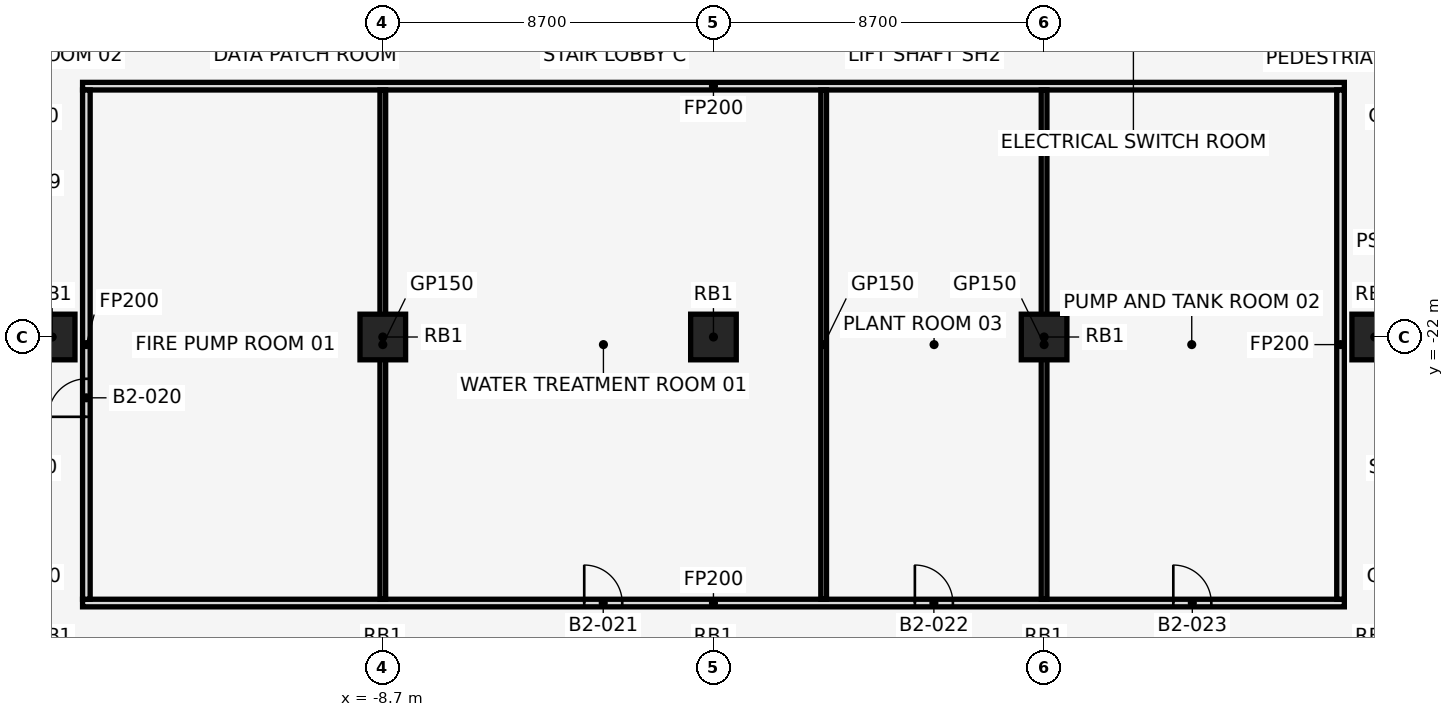
"""IFC4 building model, lengths in metres.
Left out: names, types, materials, properties, quantities, classifications, styles, units other than length and angle.
Written with IfcOpenShell. Run it as: python <this file> out.ifc"""

import sys

from ifc_helpers import new_model, si_unit, direction, frame, frame_2d, origin, origin_2d, place, context, subcontext, project, spatial, rectangle, extrude, element, fill, save


model = new_model("IFC4")
c1 = context("Model", 3, precision=1e-05, world=origin(), true_north=direction((0.0, 1.0)))
c2 = subcontext(c1, "Body", "Model", "MODEL_VIEW")
j1 = project(units=[si_unit("LENGTHUNIT", "METRE"), si_unit("PLANEANGLEUNIT", "RADIAN")], contexts=[c1])
p1 = place(None, origin())
s1 = spatial("IfcSite", under=j1, at=p1, CompositionType="ELEMENT")
p2 = place(p1, origin())
s2 = spatial("IfcBuilding", under=s1, at=p2, CompositionType="ELEMENT")
p3 = place(p2, frame((0.0, 0.0, -10.0)))
s3 = spatial("IfcBuildingStorey", under=s2, at=p3, CompositionType="ELEMENT", Elevation=-10.0)
for number, where, z_axis, x_axis in (
    (1, (-17.4, -22.0, 0.0), (0.0, 0.0, 1.0), (1.0, 0.0, 0.0)),
    (2, (-8.7, -22.0, 0.0), (0.0, 0.0, 1.0), (1.0, 0.0, 0.0)),
    (3, (0.0, -22.0, 0.0), (0.0, 0.0, 1.0), (1.0, 0.0, 0.0)),
    (4, (8.7, -22.0, 0.0), (0.0, 0.0, 1.0), (1.0, 0.0, 0.0)),
    (5, (17.4, -22.0, 0.0), (0.0, 0.0, 1.0), (1.0, 0.0, 0.0)),
):
    element("IfcColumn", number, at=place(p3, frame(where, z_axis=z_axis, x_axis=x_axis)), inside=s3, PredefinedType="COLUMN", context=c2, shape_type="SweptSolid", body=[
        extrude(rectangle(XDim=1.2, YDim=1.2, at=origin_2d()), origin(), (0.0, 0.0, 1.0), 5.0),
    ])
p4 = place(p3, frame((-16.6, -29.0, 0.0), z_axis=(0.0, 0.0, 1.0), x_axis=(1.0, 0.0, 0.0)))
e6 = element("IfcWall", 6, at=p4, inside=s3, PredefinedType="PARTITIONING", context=c2, shape_type="SweptSolid", body=[
    extrude(rectangle(XDim=33.2, YDim=0.2, at=frame_2d((16.6, 0.0))), origin(), (0.0, 0.0, 1.0), 4.7),
])
p5 = place(p4, frame((13.2, 0.0, 0.0)))
e7 = element("IfcOpeningElement", 7, at=p5, cuts=e6, PredefinedType="OPENING", context=c2, shape_type="SweptSolid", body=[
    extrude(rectangle(XDim=1.0, YDim=2.1, at=frame_2d((0.5, 1.05))), frame((0.0, 0.112, 0.0), z_axis=(0.0, -1.0, 0.0), x_axis=(1.0, 0.0, 0.0)), (0.0, 0.0, 1.0), 0.224),
])
p6 = place(p4, frame((21.9, 0.0, 0.0)))
e8 = element("IfcOpeningElement", 8, at=p6, cuts=e6, PredefinedType="OPENING", context=c2, shape_type="SweptSolid", body=[
    extrude(rectangle(XDim=1.0, YDim=2.1, at=frame_2d((0.5, 1.05))), frame((0.0, 0.112, 0.0), z_axis=(0.0, -1.0, 0.0), x_axis=(1.0, 0.0, 0.0)), (0.0, 0.0, 1.0), 0.224),
])
p7 = place(p4, frame((28.7, 0.0, 0.0)))
e9 = element("IfcOpeningElement", 9, at=p7, cuts=e6, PredefinedType="OPENING", context=c2, shape_type="SweptSolid", body=[
    extrude(rectangle(XDim=1.0, YDim=2.1, at=frame_2d((0.5, 1.05))), frame((0.0, 0.112, 0.0), z_axis=(0.0, -1.0, 0.0), x_axis=(1.0, 0.0, 0.0)), (0.0, 0.0, 1.0), 0.224),
])
p8 = place(p3, frame((-16.6, -15.4, 0.0), z_axis=(0.0, 0.0, 1.0), x_axis=(1.0, 0.0, 0.0)))
e10 = element("IfcWall", 10, at=p8, inside=s3, PredefinedType="PARTITIONING", context=c2, shape_type="SweptSolid", body=[
    extrude(rectangle(XDim=33.2, YDim=0.2, at=frame_2d((16.6, 0.0))), origin(), (0.0, 0.0, 1.0), 4.7),
])
p9 = place(p3, frame((-16.5, -28.9, 0.0), z_axis=(0.0, 0.0, 1.0), x_axis=(0.0, 1.0, 0.0)))
e11 = element("IfcWall", 11, at=p9, inside=s3, PredefinedType="PARTITIONING", context=c2, shape_type="SweptSolid", body=[
    extrude(rectangle(XDim=13.4, YDim=0.2, at=frame_2d((6.7, 0.0))), origin(), (0.0, 0.0, 1.0), 4.7),
])
p10 = place(p9, frame((4.8, 0.0, 0.0)))
e12 = element("IfcOpeningElement", 12, at=p10, cuts=e11, PredefinedType="OPENING", context=c2, shape_type="SweptSolid", body=[
    extrude(rectangle(XDim=1.0, YDim=2.1, at=frame_2d((0.5, 1.05))), frame((0.0, 0.112, 0.0), z_axis=(0.0, -1.0, 0.0), x_axis=(1.0, 0.0, 0.0)), (0.0, 0.0, 1.0), 0.224),
])
for number, where, z_axis, x_axis in (
    (13, (-8.7, -28.9, 0.0), (0.0, 0.0, 1.0), (0.0, 1.0, 0.0)),
    (14, (2.9, -28.9, 0.0), (0.0, 0.0, 1.0), (0.0, 1.0, 0.0)),
    (15, (8.7, -28.9, 0.0), (0.0, 0.0, 1.0), (0.0, 1.0, 0.0)),
):
    element("IfcWall", number, at=place(p3, frame(where, z_axis=z_axis, x_axis=x_axis)), inside=s3, PredefinedType="PARTITIONING", context=c2, shape_type="SweptSolid", body=[
        extrude(rectangle(XDim=13.4, YDim=0.15, at=frame_2d((6.7, 0.0))), origin(), (0.0, 0.0, 1.0), 4.7),
    ])
p11 = place(p3, frame((16.5, -28.9, 0.0), z_axis=(0.0, 0.0, 1.0), x_axis=(0.0, 1.0, 0.0)))
e16 = element("IfcWall", 16, at=p11, inside=s3, PredefinedType="PARTITIONING", context=c2, shape_type="SweptSolid", body=[
    extrude(rectangle(XDim=13.4, YDim=0.2, at=frame_2d((6.7, 0.0))), origin(), (0.0, 0.0, 1.0), 4.7),
])
p12 = place(p10, frame((1.0, 0.0, 0.0), z_axis=(0.0, 0.0, 1.0), x_axis=(-1.0, 0.0, 0.0)))
e17 = element("IfcDoor", 17, at=p12, inside=s3, OperationType="SINGLE_SWING_RIGHT", PredefinedType="DOOR", context=c2, shape_type="SweptSolid", body=[
    extrude(rectangle(XDim=1.0, YDim=2.1, at=frame_2d((0.5, 1.05))), frame((0.0, 0.025, 0.0), z_axis=(0.0, -1.0, 0.0), x_axis=(1.0, 0.0, 0.0)), (0.0, 0.0, 1.0), 0.05),
])
fill(e12, e17)
p13 = place(p5, origin())
e18 = element("IfcDoor", 18, at=p13, inside=s3, OperationType="SINGLE_SWING_RIGHT", PredefinedType="DOOR", context=c2, shape_type="SweptSolid", body=[
    extrude(rectangle(XDim=1.0, YDim=2.1, at=frame_2d((0.5, 1.05))), frame((0.0, 0.025, 0.0), z_axis=(0.0, -1.0, 0.0), x_axis=(1.0, 0.0, 0.0)), (0.0, 0.0, 1.0), 0.05),
])
fill(e7, e18)
p14 = place(p6, origin())
e19 = element("IfcDoor", 19, at=p14, inside=s3, OperationType="SINGLE_SWING_LEFT", PredefinedType="DOOR", context=c2, shape_type="SweptSolid", body=[
    extrude(rectangle(XDim=1.0, YDim=2.1, at=frame_2d((0.5, 1.05))), frame((0.0, 0.025, 0.0), z_axis=(0.0, -1.0, 0.0), x_axis=(1.0, 0.0, 0.0)), (0.0, 0.0, 1.0), 0.05),
])
fill(e8, e19)
p15 = place(p7, origin())
e20 = element("IfcDoor", 20, at=p15, inside=s3, OperationType="SINGLE_SWING_LEFT", PredefinedType="DOOR", context=c2, shape_type="SweptSolid", body=[
    extrude(rectangle(XDim=1.0, YDim=2.1, at=frame_2d((0.5, 1.05))), frame((0.0, 0.025, 0.0), z_axis=(0.0, -1.0, 0.0), x_axis=(1.0, 0.0, 0.0)), (0.0, 0.0, 1.0), 0.05),
])
fill(e9, e20)
save(model, sys.argv[1])
